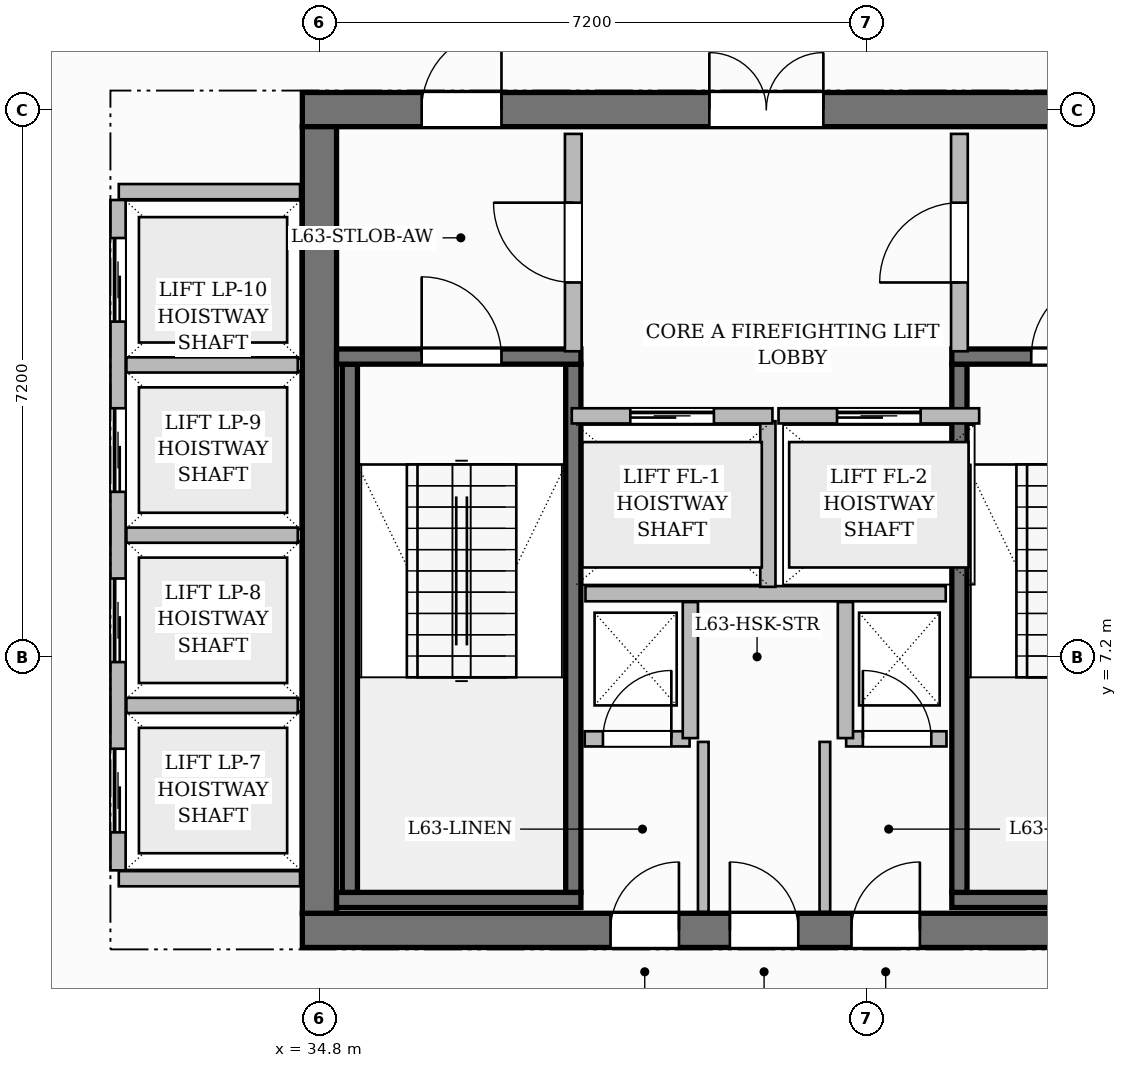
"""IFC4 building model, lengths in metres.
Left out: names, types, materials, properties, quantities, classifications, styles, units other than length and angle.
Written with IfcOpenShell. Run it as: python <this file> out.ifc"""

import sys

from ifc_helpers import new_model, si_unit, direction, frame, frame_2d, origin, place, context, subcontext, project, spatial, rectangle, extrude, source, transform, mapped, element, fill, save


model = new_model("IFC4")
c1 = context("Model", 3, precision=1e-05, world=origin(), true_north=direction((0.0, 1.0)))
c2 = subcontext(c1, "Body", "Model", "MODEL_VIEW")
j1 = project(units=[si_unit("LENGTHUNIT", "METRE"), si_unit("PLANEANGLEUNIT", "RADIAN")], contexts=[c1])
p1 = place(None, origin())
s1 = spatial("IfcSite", under=j1, at=p1, CompositionType="ELEMENT")
p2 = place(p1, origin())
s2 = spatial("IfcBuilding", under=s1, at=p2, CompositionType="ELEMENT")
p3 = place(p2, frame((0.0, 0.0, 251.95)))
s3 = spatial("IfcBuildingStorey", under=s2, at=p3, CompositionType="ELEMENT", Elevation=251.95)
p4 = place(p3, frame((34.575, 3.6, 0.0), z_axis=(0.0, 0.0, 1.0), x_axis=(1.0, 0.0, 0.0)))
e1 = element("IfcWall", 1, at=p4, inside=s3, PredefinedType="SHEAR", context=c2, shape_type="SweptSolid", body=[
    extrude(rectangle(XDim=15.45, YDim=0.45, at=frame_2d((7.725, 0.0))), origin(), (0.0, 0.0, 1.0), 3.85),
])
p5 = place(p4, frame((4.055, 0.0, 0.0)))
e2 = element("IfcOpeningElement", 2, at=p5, cuts=e1, PredefinedType="OPENING", context=c2, shape_type="SweptSolid", body=[
    extrude(rectangle(XDim=0.9, YDim=2.1, at=frame_2d((0.45, 1.05))), frame((0.0, 0.235, 0.0), z_axis=(0.0, -1.0, 0.0), x_axis=(1.0, 0.0, 0.0)), (0.0, 0.0, 1.0), 0.47),
])
p6 = place(p4, frame((5.625, 0.0, 0.0)))
e3 = element("IfcOpeningElement", 3, at=p6, cuts=e1, PredefinedType="OPENING", context=c2, shape_type="SweptSolid", body=[
    extrude(rectangle(XDim=0.9, YDim=2.1, at=frame_2d((0.45, 1.05))), frame((0.0, 0.235, 0.0), z_axis=(0.0, -1.0, 0.0), x_axis=(1.0, 0.0, 0.0)), (0.0, 0.0, 1.0), 0.47),
])
p7 = place(p4, frame((7.225, 0.0, 0.0)))
e4 = element("IfcOpeningElement", 4, at=p7, cuts=e1, PredefinedType="OPENING", context=c2, shape_type="SweptSolid", body=[
    extrude(rectangle(XDim=0.9, YDim=2.1, at=frame_2d((0.45, 1.05))), frame((0.0, 0.235, 0.0), z_axis=(0.0, -1.0, 0.0), x_axis=(1.0, 0.0, 0.0)), (0.0, 0.0, 1.0), 0.47),
])
p8 = place(p3, frame((34.575, 14.4, 0.0), z_axis=(0.0, 0.0, 1.0), x_axis=(1.0, 0.0, 0.0)))
e5 = element("IfcWall", 5, at=p8, inside=s3, PredefinedType="SHEAR", context=c2, shape_type="SweptSolid", body=[
    extrude(rectangle(XDim=15.45, YDim=0.45, at=frame_2d((7.725, 0.0))), origin(), (0.0, 0.0, 1.0), 3.85),
])
p9 = place(p8, frame((5.355, 0.0, 0.0)))
e6 = element("IfcOpeningElement", 6, at=p9, cuts=e5, PredefinedType="OPENING", context=c2, shape_type="SweptSolid", body=[
    extrude(rectangle(XDim=1.5, YDim=2.2, at=frame_2d((0.75, 1.1))), frame((0.0, 0.235, 0.0), z_axis=(0.0, -1.0, 0.0), x_axis=(1.0, 0.0, 0.0)), (0.0, 0.0, 1.0), 0.47),
])
p10 = place(p8, frame((1.57, 0.0, 0.0)))
e7 = element("IfcOpeningElement", 7, at=p10, cuts=e5, PredefinedType="OPENING", context=c2, shape_type="SweptSolid", body=[
    extrude(rectangle(XDim=1.05, YDim=2.15, at=frame_2d((0.525, 1.075))), frame((0.0, 0.235, 0.0), z_axis=(0.0, -1.0, 0.0), x_axis=(1.0, 0.0, 0.0)), (0.0, 0.0, 1.0), 0.47),
])
p11 = place(p8, frame((11.2, 0.0, 0.0)))
e8 = element("IfcOpeningElement", 8, at=p11, cuts=e5, PredefinedType="OPENING", context=c2, shape_type="SweptSolid", body=[
    extrude(rectangle(XDim=1.05, YDim=2.15, at=frame_2d((0.525, 1.075))), frame((0.0, 0.235, 0.0), z_axis=(0.0, -1.0, 0.0), x_axis=(1.0, 0.0, 0.0)), (0.0, 0.0, 1.0), 0.47),
])
p12 = place(p3, frame((34.8, 3.825, 0.0), z_axis=(0.0, 0.0, 1.0), x_axis=(0.0, 1.0, 0.0)))
e9 = element("IfcWall", 9, at=p12, inside=s3, PredefinedType="SHEAR", context=c2, shape_type="SweptSolid", body=[
    extrude(rectangle(XDim=10.35, YDim=0.45, at=frame_2d((5.175, 0.0))), origin(), (0.0, 0.0, 1.0), 3.85),
])
p13 = place(p3, frame((35.025, 4.0, 0.0), z_axis=(0.0, 0.0, 1.0), x_axis=(1.0, 0.0, 0.0)))
e10 = element("IfcWall", 10, at=p13, inside=s3, PredefinedType="SHEAR", context=c2, shape_type="SweptSolid", body=[
    extrude(rectangle(XDim=3.215, YDim=0.2, at=frame_2d((1.607, 0.0))), origin(), (0.0, 0.0, 1.0), 3.85),
])
for number, where, z_axis, x_axis in (
    (11, (35.2, 4.1, 0.0), (0.0, 0.0, 1.0), (0.0, 1.0, 0.0)),
    (12, (38.14, 4.1, 0.0), (0.0, 0.0, 1.0), (0.0, 1.0, 0.0)),
):
    element("IfcWall", number, at=place(p3, frame(where, z_axis=z_axis, x_axis=x_axis)), inside=s3, PredefinedType="SHEAR", context=c2, shape_type="SweptSolid", body=[
        extrude(rectangle(XDim=6.95, YDim=0.2, at=frame_2d((3.475, 0.0))), origin(), (0.0, 0.0, 1.0), 3.85),
    ])
p14 = place(p3, frame((35.025, 11.15, 0.0), z_axis=(0.0, 0.0, 1.0), x_axis=(1.0, 0.0, 0.0)))
e13 = element("IfcWall", 13, at=p14, inside=s3, PredefinedType="SHEAR", context=c2, shape_type="SweptSolid", body=[
    extrude(rectangle(XDim=3.215, YDim=0.2, at=frame_2d((1.607, 0.0))), origin(), (0.0, 0.0, 1.0), 3.85),
])
p15 = place(p14, frame((1.12, 0.0, 0.0)))
e14 = element("IfcOpeningElement", 14, at=p15, cuts=e13, PredefinedType="OPENING", context=c2, shape_type="SweptSolid", body=[
    extrude(rectangle(XDim=1.05, YDim=2.2, at=frame_2d((0.525, 1.1))), frame((0.0, 0.11, 0.0), z_axis=(0.0, -1.0, 0.0), x_axis=(1.0, 0.0, 0.0)), (0.0, 0.0, 1.0), 0.22),
])
p16 = place(p3, frame((43.12, 4.0, 0.0), z_axis=(0.0, 0.0, 1.0), x_axis=(1.0, 0.0, 0.0)))
e15 = element("IfcWall", 15, at=p16, inside=s3, PredefinedType="SHEAR", context=c2, shape_type="SweptSolid", body=[
    extrude(rectangle(XDim=6.455, YDim=0.2, at=frame_2d((3.228, 0.0))), origin(), (0.0, 0.0, 1.0), 3.85),
])
p17 = place(p3, frame((43.22, 4.1, 0.0), z_axis=(0.0, 0.0, 1.0), x_axis=(0.0, 1.0, 0.0)))
e16 = element("IfcWall", 16, at=p17, inside=s3, PredefinedType="SHEAR", context=c2, shape_type="SweptSolid", body=[
    extrude(rectangle(XDim=6.95, YDim=0.2, at=frame_2d((3.475, 0.0))), origin(), (0.0, 0.0, 1.0), 3.85),
])
p18 = place(p3, frame((43.12, 11.15, 0.0), z_axis=(0.0, 0.0, 1.0), x_axis=(1.0, 0.0, 0.0)))
e17 = element("IfcWall", 17, at=p18, inside=s3, PredefinedType="SHEAR", context=c2, shape_type="SweptSolid", body=[
    extrude(rectangle(XDim=6.455, YDim=0.2, at=frame_2d((3.228, 0.0))), origin(), (0.0, 0.0, 1.0), 3.85),
])
p19 = place(p18, frame((1.045, 0.0, 0.0)))
e18 = element("IfcOpeningElement", 18, at=p19, cuts=e17, PredefinedType="OPENING", context=c2, shape_type="SweptSolid", body=[
    extrude(rectangle(XDim=1.05, YDim=2.2, at=frame_2d((0.525, 1.1))), frame((0.0, 0.11, 0.0), z_axis=(0.0, -1.0, 0.0), x_axis=(1.0, 0.0, 0.0)), (0.0, 0.0, 1.0), 0.22),
])
p20 = place(p18, frame((4.125, 0.0, 0.0)))
e19 = element("IfcOpeningElement", 19, at=p20, cuts=e17, PredefinedType="OPENING", context=c2, shape_type="SweptSolid", body=[
    extrude(rectangle(XDim=1.05, YDim=2.2, at=frame_2d((0.525, 1.1))), frame((0.0, 0.11, 0.0), z_axis=(0.0, -1.0, 0.0), x_axis=(1.0, 0.0, 0.0)), (0.0, 0.0, 1.0), 0.22),
])
p21 = place(p3, frame((38.3, 8.03, 0.0), z_axis=(0.0, 0.0, 1.0), x_axis=(1.0, 0.0, 0.0)))
e20 = element("IfcWall", 20, at=p21, inside=s3, PredefinedType="PARTITIONING", context=c2, shape_type="SweptSolid", body=[
    extrude(rectangle(XDim=4.74, YDim=0.2, at=frame_2d((2.37, 0.0))), origin(), (0.0, 0.0, 1.0), 3.6),
])
p22 = place(p3, frame((40.7, 8.12, 0.0), z_axis=(0.0, 0.0, 1.0), x_axis=(0.0, 1.0, 0.0)))
e21 = element("IfcWall", 21, at=p22, inside=s3, PredefinedType="PARTITIONING", context=c2, shape_type="SweptSolid", body=[
    extrude(rectangle(XDim=2.18, YDim=0.2, at=frame_2d((1.09, 0.0))), origin(), (0.0, 0.0, 1.0), 3.6),
])
p23 = place(p3, frame((38.14, 11.22, 0.0), z_axis=(0.0, 0.0, 1.0), x_axis=(0.0, 1.0, 0.0)))
e22 = element("IfcWall", 22, at=p23, inside=s3, PredefinedType="PARTITIONING", context=c2, shape_type="SweptSolid", body=[
    extrude(rectangle(XDim=2.86, YDim=0.22, at=frame_2d((1.43, 0.0))), origin(), (0.0, 0.0, 1.0), 3.6),
])
p24 = place(p23, frame((0.905, 0.0, 0.0)))
e23 = element("IfcOpeningElement", 23, at=p24, cuts=e22, PredefinedType="OPENING", context=c2, shape_type="SweptSolid", body=[
    extrude(rectangle(XDim=1.05, YDim=2.15, at=frame_2d((0.525, 1.075))), frame((0.0, 0.12, 0.0), z_axis=(0.0, -1.0, 0.0), x_axis=(1.0, 0.0, 0.0)), (0.0, 0.0, 1.0), 0.24),
])
p25 = place(p3, frame((43.22, 11.22, 0.0), z_axis=(0.0, 0.0, 1.0), x_axis=(0.0, 1.0, 0.0)))
e24 = element("IfcWall", 24, at=p25, inside=s3, PredefinedType="PARTITIONING", context=c2, shape_type="SweptSolid", body=[
    extrude(rectangle(XDim=2.86, YDim=0.22, at=frame_2d((1.43, 0.0))), origin(), (0.0, 0.0, 1.0), 3.6),
])
p26 = place(p25, frame((0.905, 0.0, 0.0)))
e25 = element("IfcOpeningElement", 25, at=p26, cuts=e24, PredefinedType="OPENING", context=c2, shape_type="SweptSolid", body=[
    extrude(rectangle(XDim=1.05, YDim=2.15, at=frame_2d((0.525, 1.075))), frame((0.0, 0.12, 0.0), z_axis=(0.0, -1.0, 0.0), x_axis=(1.0, 0.0, 0.0)), (0.0, 0.0, 1.0), 0.24),
])
p27 = place(p3, frame((38.29, 6.12, 0.0), z_axis=(0.0, 0.0, 1.0), x_axis=(1.0, 0.0, 0.0)))
e26 = element("IfcWall", 26, at=p27, inside=s3, PredefinedType="PARTITIONING", context=c2, shape_type="SweptSolid", body=[
    extrude(rectangle(XDim=1.38, YDim=0.2, at=frame_2d((0.69, 0.0))), origin(), (0.0, 0.0, 1.0), 3.6),
])
p28 = place(p27, frame((0.24, 0.0, 0.0)))
e27 = element("IfcOpeningElement", 27, at=p28, cuts=e26, PredefinedType="OPENING", context=c2, shape_type="SweptSolid", body=[
    extrude(rectangle(XDim=0.9, YDim=2.1, at=frame_2d((0.45, 1.05))), frame((0.0, 0.11, 0.0), z_axis=(0.0, -1.0, 0.0), x_axis=(1.0, 0.0, 0.0)), (0.0, 0.0, 1.0), 0.22),
])
p29 = place(p3, frame((39.68, 6.13, 0.0), z_axis=(0.0, 0.0, 1.0), x_axis=(0.0, 1.0, 0.0)))
e28 = element("IfcWall", 28, at=p29, inside=s3, PredefinedType="PARTITIONING", context=c2, shape_type="SweptSolid", body=[
    extrude(rectangle(XDim=1.79, YDim=0.2, at=frame_2d((0.895, 0.0))), origin(), (0.0, 0.0, 1.0), 3.6),
])
p30 = place(p3, frame((41.73, 6.12, 0.0), z_axis=(0.0, 0.0, 1.0), x_axis=(1.0, 0.0, 0.0)))
e29 = element("IfcWall", 29, at=p30, inside=s3, PredefinedType="PARTITIONING", context=c2, shape_type="SweptSolid", body=[
    extrude(rectangle(XDim=1.32, YDim=0.2, at=frame_2d((0.66, 0.0))), origin(), (0.0, 0.0, 1.0), 3.6),
])
p31 = place(p30, frame((0.22, 0.0, 0.0)))
e30 = element("IfcOpeningElement", 30, at=p31, cuts=e29, PredefinedType="OPENING", context=c2, shape_type="SweptSolid", body=[
    extrude(rectangle(XDim=0.9, YDim=2.1, at=frame_2d((0.45, 1.05))), frame((0.0, 0.11, 0.0), z_axis=(0.0, -1.0, 0.0), x_axis=(1.0, 0.0, 0.0)), (0.0, 0.0, 1.0), 0.22),
])
p32 = place(p3, frame((41.72, 6.13, 0.0), z_axis=(0.0, 0.0, 1.0), x_axis=(0.0, 1.0, 0.0)))
e31 = element("IfcWall", 31, at=p32, inside=s3, PredefinedType="PARTITIONING", context=c2, shape_type="SweptSolid", body=[
    extrude(rectangle(XDim=1.79, YDim=0.2, at=frame_2d((0.895, 0.0))), origin(), (0.0, 0.0, 1.0), 3.6),
])
for number, where, z_axis, x_axis in (
    (32, (39.85, 3.845, 0.0), (0.0, 0.0, 1.0), (0.0, 1.0, 0.0)),
    (33, (41.45, 3.845, 0.0), (0.0, 0.0, 1.0), (0.0, 1.0, 0.0)),
):
    element("IfcWall", number, at=place(p3, frame(where, z_axis=z_axis, x_axis=x_axis)), inside=s3, PredefinedType="PARTITIONING", context=c2, shape_type="SweptSolid", body=[
        extrude(rectangle(XDim=2.235, YDim=0.14, at=frame_2d((1.118, 0.0))), origin(), (0.0, 0.0, 1.0), 3.6),
    ])
for number, where, z_axis, x_axis in (
    (34, (32.16, 4.28, 0.0), (0.0, 0.0, 1.0), (1.0, 0.0, 0.0)),
    (35, (32.16, 13.32, 0.0), (0.0, 0.0, 1.0), (1.0, 0.0, 0.0)),
):
    element("IfcWall", number, at=place(p3, frame(where, z_axis=z_axis, x_axis=x_axis)), inside=s3, PredefinedType="PARTITIONING", context=c2, shape_type="SweptSolid", body=[
        extrude(rectangle(XDim=2.385, YDim=0.2, at=frame_2d((1.192, 0.0))), origin(), (0.0, 0.0, 1.0), 3.6),
    ])
p33 = place(p3, frame((32.15, 4.39, 0.0), z_axis=(0.0, 0.0, 1.0), x_axis=(0.0, 1.0, 0.0)))
e36 = element("IfcWall", 36, at=p33, inside=s3, PredefinedType="PARTITIONING", context=c2, shape_type="SweptSolid", body=[
    extrude(rectangle(XDim=8.82, YDim=0.2, at=frame_2d((4.41, 0.0))), origin(), (0.0, 0.0, 1.0), 3.6),
])
p34 = place(p33, frame((0.5, 0.0, 0.0)))
e37 = element("IfcOpeningElement", 37, at=p34, cuts=e36, PredefinedType="OPENING", context=c2, shape_type="SweptSolid", body=[
    extrude(rectangle(XDim=1.1, YDim=2.2, at=frame_2d((0.55, 1.1))), frame((0.0, 0.11, 0.0), z_axis=(0.0, -1.0, 0.0), x_axis=(1.0, 0.0, 0.0)), (0.0, 0.0, 1.0), 0.22),
])
p35 = place(p33, frame((2.74, 0.0, 0.0)))
e38 = element("IfcOpeningElement", 38, at=p35, cuts=e36, PredefinedType="OPENING", context=c2, shape_type="SweptSolid", body=[
    extrude(rectangle(XDim=1.1, YDim=2.2, at=frame_2d((0.55, 1.1))), frame((0.0, 0.11, 0.0), z_axis=(0.0, -1.0, 0.0), x_axis=(1.0, 0.0, 0.0)), (0.0, 0.0, 1.0), 0.22),
])
p36 = place(p33, frame((4.98, 0.0, 0.0)))
e39 = element("IfcOpeningElement", 39, at=p36, cuts=e36, PredefinedType="OPENING", context=c2, shape_type="SweptSolid", body=[
    extrude(rectangle(XDim=1.1, YDim=2.2, at=frame_2d((0.55, 1.1))), frame((0.0, 0.11, 0.0), z_axis=(0.0, -1.0, 0.0), x_axis=(1.0, 0.0, 0.0)), (0.0, 0.0, 1.0), 0.22),
])
p37 = place(p33, frame((7.22, 0.0, 0.0)))
e40 = element("IfcOpeningElement", 40, at=p37, cuts=e36, PredefinedType="OPENING", context=c2, shape_type="SweptSolid", body=[
    extrude(rectangle(XDim=1.1, YDim=2.2, at=frame_2d((0.55, 1.1))), frame((0.0, 0.11, 0.0), z_axis=(0.0, -1.0, 0.0), x_axis=(1.0, 0.0, 0.0)), (0.0, 0.0, 1.0), 0.22),
])
for number, where, z_axis, x_axis in (
    (41, (32.26, 6.56, 0.0), (0.0, 0.0, 1.0), (1.0, 0.0, 0.0)),
    (42, (32.26, 8.8, 0.0), (0.0, 0.0, 1.0), (1.0, 0.0, 0.0)),
    (43, (32.26, 11.04, 0.0), (0.0, 0.0, 1.0), (1.0, 0.0, 0.0)),
):
    element("IfcWall", number, at=place(p3, frame(where, z_axis=z_axis, x_axis=x_axis)), inside=s3, PredefinedType="PARTITIONING", context=c2, shape_type="SweptSolid", body=[
        extrude(rectangle(XDim=2.255, YDim=0.2, at=frame_2d((1.127, 0.0))), origin(), (0.0, 0.0, 1.0), 3.6),
    ])
p38 = place(p3, frame((38.12, 10.37, 0.0), z_axis=(0.0, 0.0, 1.0), x_axis=(1.0, 0.0, 0.0)))
e44 = element("IfcWall", 44, at=p38, inside=s3, PredefinedType="PARTITIONING", context=c2, shape_type="SweptSolid", body=[
    extrude(rectangle(XDim=2.64, YDim=0.2, at=frame_2d((1.32, 0.0))), origin(), (0.0, 0.0, 1.0), 3.6),
])
p39 = place(p38, frame((0.77, 0.0, 0.0)))
e45 = element("IfcOpeningElement", 45, at=p39, cuts=e44, PredefinedType="OPENING", context=c2, shape_type="SweptSolid", body=[
    extrude(rectangle(XDim=1.1, YDim=2.2, at=frame_2d((0.55, 1.1))), frame((0.0, 0.11, 0.0), z_axis=(0.0, -1.0, 0.0), x_axis=(1.0, 0.0, 0.0)), (0.0, 0.0, 1.0), 0.22),
])
p40 = place(p3, frame((40.84, 10.37, 0.0), z_axis=(0.0, 0.0, 1.0), x_axis=(1.0, 0.0, 0.0)))
e46 = element("IfcWall", 46, at=p40, inside=s3, PredefinedType="PARTITIONING", context=c2, shape_type="SweptSolid", body=[
    extrude(rectangle(XDim=2.64, YDim=0.2, at=frame_2d((1.32, 0.0))), origin(), (0.0, 0.0, 1.0), 3.6),
])
p41 = place(p40, frame((0.77, 0.0, 0.0)))
e47 = element("IfcOpeningElement", 47, at=p41, cuts=e46, PredefinedType="OPENING", context=c2, shape_type="SweptSolid", body=[
    extrude(rectangle(XDim=1.1, YDim=2.2, at=frame_2d((0.55, 1.1))), frame((0.0, 0.11, 0.0), z_axis=(0.0, -1.0, 0.0), x_axis=(1.0, 0.0, 0.0)), (0.0, 0.0, 1.0), 0.22),
])
m1 = source(origin(), c2, "Body", "SweptSolid", [
    extrude(rectangle(XDim=1.05, YDim=2.2, at=frame_2d((0.525, 1.1))), frame((0.0, 0.025, 0.0), z_axis=(0.0, -1.0, 0.0), x_axis=(1.0, 0.0, 0.0)), (0.0, 0.0, 1.0), 0.05),
])
p42 = place(p15, origin())
e48 = element("IfcDoor", 48, at=p42, inside=s3, OperationType="SINGLE_SWING_LEFT", PredefinedType="DOOR", context=c2, shape_type="MappedRepresentation", body=[
    mapped(m1, transform((0.0, 0.0, 0.0), scale=1.0)),
])
fill(e14, e48)
p43 = place(p19, origin())
e49 = element("IfcDoor", 49, at=p43, inside=s3, OperationType="SINGLE_SWING_RIGHT", PredefinedType="DOOR", context=c2, shape_type="MappedRepresentation", body=[
    mapped(m1, transform((0.0, 0.0, 0.0), scale=1.0)),
])
fill(e18, e49)
m2 = source(origin(), c2, "Body", "SweptSolid", [
    extrude(rectangle(XDim=1.05, YDim=2.15, at=frame_2d((0.525, 1.075))), frame((0.0, 0.025, 0.0), z_axis=(0.0, -1.0, 0.0), x_axis=(1.0, 0.0, 0.0)), (0.0, 0.0, 1.0), 0.05),
])
p44 = place(p24, origin())
e50 = element("IfcDoor", 50, at=p44, inside=s3, OperationType="SINGLE_SWING_RIGHT", PredefinedType="DOOR", context=c2, shape_type="MappedRepresentation", body=[
    mapped(m2, transform((0.0, 0.0, 0.0), scale=1.0)),
])
fill(e23, e50)
p45 = place(p26, origin())
e51 = element("IfcDoor", 51, at=p45, inside=s3, OperationType="SINGLE_SWING_LEFT", PredefinedType="DOOR", context=c2, shape_type="MappedRepresentation", body=[
    mapped(m2, transform((0.0, 0.0, 0.0), scale=1.0)),
])
fill(e25, e51)
m3 = source(origin(), c2, "Body", "SweptSolid", [
    extrude(rectangle(XDim=1.5, YDim=2.2, at=frame_2d((0.75, 1.1))), frame((0.0, 0.025, 0.0), z_axis=(0.0, -1.0, 0.0), x_axis=(1.0, 0.0, 0.0)), (0.0, 0.0, 1.0), 0.05),
])
p46 = place(p9, origin())
e52 = element("IfcDoor", 52, at=p46, inside=s3, OperationType="DOUBLE_DOOR_SINGLE_SWING", PredefinedType="DOOR", context=c2, shape_type="MappedRepresentation", body=[
    mapped(m3, transform((0.0, 0.0, 0.0), scale=1.0)),
])
fill(e6, e52)
p47 = place(p10, origin())
e53 = element("IfcDoor", 53, at=p47, inside=s3, OperationType="SINGLE_SWING_RIGHT", PredefinedType="DOOR", context=c2, shape_type="MappedRepresentation", body=[
    mapped(m2, transform((0.0, 0.0, 0.0), scale=1.0)),
])
fill(e7, e53)
m4 = source(origin(), c2, "Body", "SweptSolid", [
    extrude(rectangle(XDim=0.9, YDim=2.1, at=frame_2d((0.45, 1.05))), frame((0.0, 0.025, 0.0), z_axis=(0.0, -1.0, 0.0), x_axis=(1.0, 0.0, 0.0)), (0.0, 0.0, 1.0), 0.05),
])
p48 = place(p28, origin())
e54 = element("IfcDoor", 54, at=p48, inside=s3, OperationType="SINGLE_SWING_RIGHT", PredefinedType="DOOR", context=c2, shape_type="MappedRepresentation", body=[
    mapped(m4, transform((0.0, 0.0, 0.0), scale=1.0)),
])
fill(e27, e54)
p49 = place(p31, origin())
e55 = element("IfcDoor", 55, at=p49, inside=s3, OperationType="SINGLE_SWING_LEFT", PredefinedType="DOOR", context=c2, shape_type="MappedRepresentation", body=[
    mapped(m4, transform((0.0, 0.0, 0.0), scale=1.0)),
])
fill(e30, e55)
p50 = place(p5, origin())
e56 = element("IfcDoor", 56, at=p50, inside=s3, OperationType="SINGLE_SWING_RIGHT", PredefinedType="DOOR", context=c2, shape_type="MappedRepresentation", body=[
    mapped(m4, transform((0.0, 0.0, 0.0), scale=1.0)),
])
fill(e2, e56)
p51 = place(p6, origin())
e57 = element("IfcDoor", 57, at=p51, inside=s3, OperationType="SINGLE_SWING_LEFT", PredefinedType="DOOR", context=c2, shape_type="MappedRepresentation", body=[
    mapped(m4, transform((0.0, 0.0, 0.0), scale=1.0)),
])
fill(e3, e57)
p52 = place(p7, origin())
e58 = element("IfcDoor", 58, at=p52, inside=s3, OperationType="SINGLE_SWING_RIGHT", PredefinedType="DOOR", context=c2, shape_type="MappedRepresentation", body=[
    mapped(m4, transform((0.0, 0.0, 0.0), scale=1.0)),
])
fill(e4, e58)
m5 = source(origin(), c2, "Body", "SweptSolid", [
    extrude(rectangle(XDim=1.1, YDim=2.2, at=frame_2d((0.55, 1.1))), frame((0.0, 0.025, 0.0), z_axis=(0.0, -1.0, 0.0), x_axis=(1.0, 0.0, 0.0)), (0.0, 0.0, 1.0), 0.05),
])
p53 = place(p39, origin())
e59 = element("IfcDoor", 59, at=p53, inside=s3, OperationType="SLIDING_TO_LEFT", PredefinedType="DOOR", context=c2, shape_type="MappedRepresentation", body=[
    mapped(m5, transform((0.0, 0.0, 0.0), scale=1.0)),
])
fill(e45, e59)
p54 = place(p41, origin())
e60 = element("IfcDoor", 60, at=p54, inside=s3, OperationType="SLIDING_TO_LEFT", PredefinedType="DOOR", context=c2, shape_type="MappedRepresentation", body=[
    mapped(m5, transform((0.0, 0.0, 0.0), scale=1.0)),
])
fill(e47, e60)
p55 = place(p34, origin())
e61 = element("IfcDoor", 61, at=p55, inside=s3, OperationType="SLIDING_TO_LEFT", PredefinedType="DOOR", context=c2, shape_type="MappedRepresentation", body=[
    mapped(m5, transform((0.0, 0.0, 0.0), scale=1.0)),
])
fill(e37, e61)
p56 = place(p35, origin())
e62 = element("IfcDoor", 62, at=p56, inside=s3, OperationType="SLIDING_TO_LEFT", PredefinedType="DOOR", context=c2, shape_type="MappedRepresentation", body=[
    mapped(m5, transform((0.0, 0.0, 0.0), scale=1.0)),
])
fill(e38, e62)
p57 = place(p36, origin())
e63 = element("IfcDoor", 63, at=p57, inside=s3, OperationType="SLIDING_TO_LEFT", PredefinedType="DOOR", context=c2, shape_type="MappedRepresentation", body=[
    mapped(m5, transform((0.0, 0.0, 0.0), scale=1.0)),
])
fill(e39, e63)
p58 = place(p37, origin())
e64 = element("IfcDoor", 64, at=p58, inside=s3, OperationType="SLIDING_TO_LEFT", PredefinedType="DOOR", context=c2, shape_type="MappedRepresentation", body=[
    mapped(m5, transform((0.0, 0.0, 0.0), scale=1.0)),
])
fill(e40, e64)
save(model, sys.argv[1])
